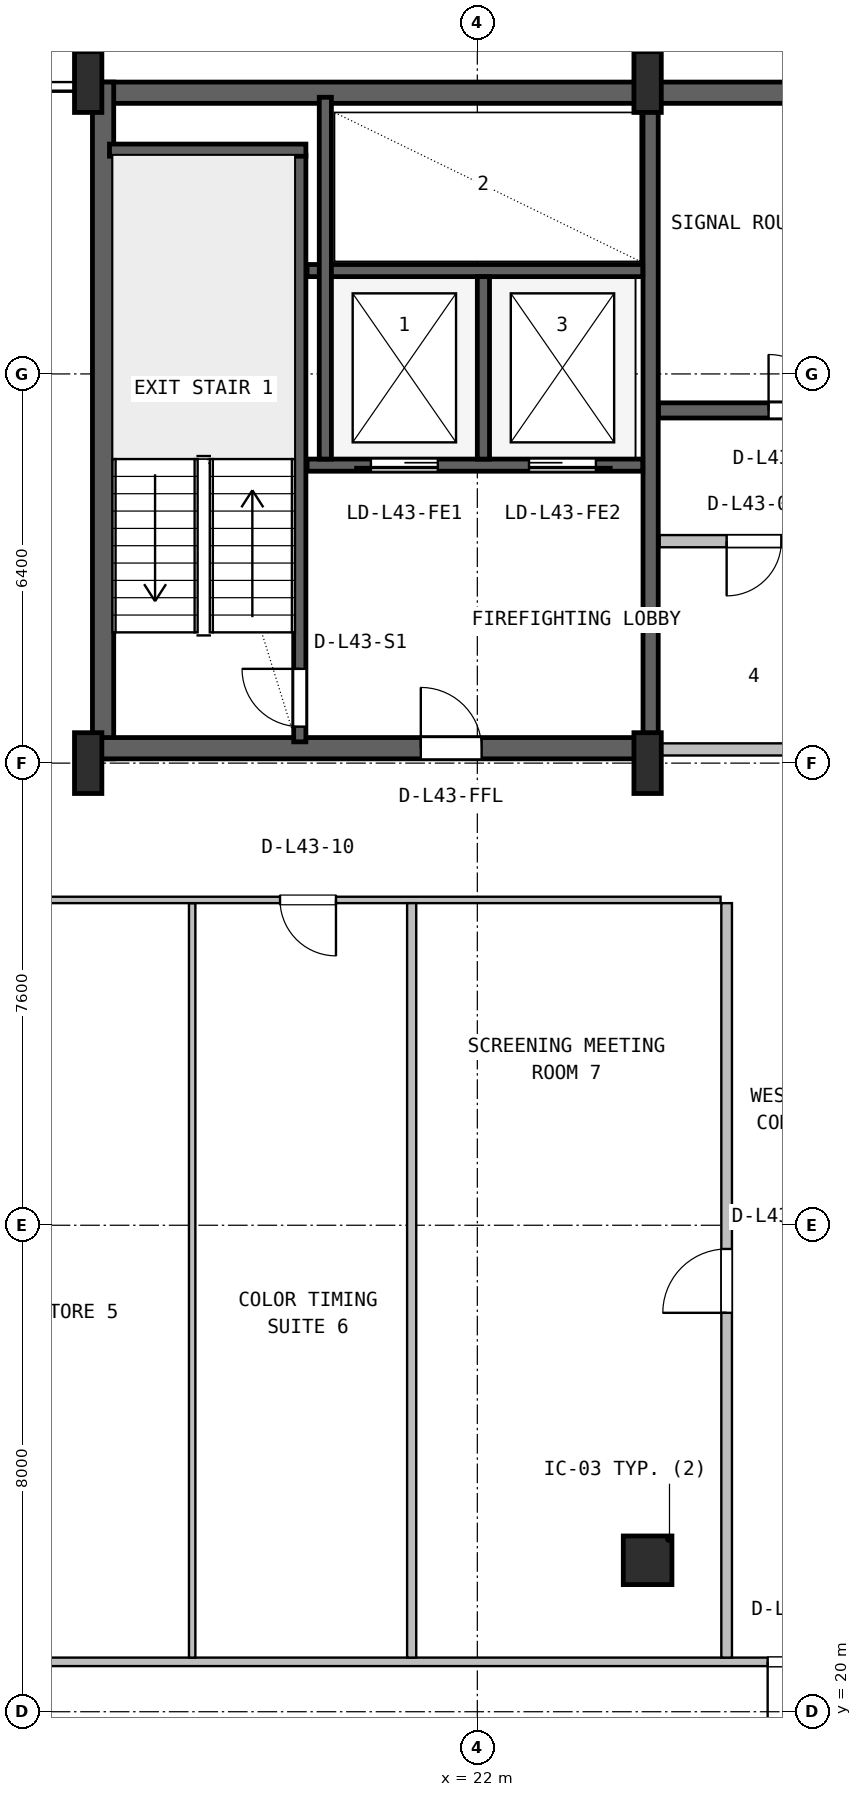
"""IFC4 building model, lengths in metres.
Left out: names, types, materials, properties, quantities, classifications, styles, units other than length and angle.
Written with IfcOpenShell. Run it as: python <this file> out.ifc"""

import sys

from ifc_helpers import new_model, si_unit, direction, frame, frame_2d, origin, origin_2d, place, context, subcontext, project, spatial, rectangle, i_section, extrude, source, transform, mapped, element, fill, save


model = new_model("IFC4")
c1 = context("Model", 3, precision=1e-05, world=origin(), true_north=direction((0.0, 1.0)))
c2 = subcontext(c1, "Body", "Model", "MODEL_VIEW")
j1 = project(units=[si_unit("LENGTHUNIT", "METRE"), si_unit("PLANEANGLEUNIT", "RADIAN")], contexts=[c1])
p1 = place(None, origin())
s1 = spatial("IfcSite", under=j1, at=p1, CompositionType="ELEMENT")
p2 = place(p1, origin())
s2 = spatial("IfcBuilding", under=s1, at=p2, CompositionType="ELEMENT")
p3 = place(p2, frame((0.0, 0.0, 176.2)))
s3 = spatial("IfcBuildingStorey", under=s2, at=p3, CompositionType="ELEMENT", Elevation=176.2)
p4 = place(p3, frame((15.6, 46.625, 0.0), z_axis=(0.0, 0.0, 1.0), x_axis=(1.0, 0.0, 0.0)))
e1 = element("IfcWall", 1, at=p4, inside=s3, PredefinedType="SHEAR", context=c2, shape_type="SweptSolid", body=[
    extrude(rectangle(XDim=36.8, YDim=0.35, at=frame_2d((18.4, 0.0))), origin(), (0.0, 0.0, 1.0), 3.55),
])
p5 = place(p3, frame((15.845, 35.67, 0.0), z_axis=(0.0, 0.0, 1.0), x_axis=(0.0, 1.0, 0.0)))
e2 = element("IfcWall", 2, at=p5, inside=s3, PredefinedType="SHEAR", context=c2, shape_type="SweptSolid", body=[
    extrude(rectangle(XDim=11.13, YDim=0.35, at=frame_2d((5.565, 0.0))), origin(), (0.0, 0.0, 1.0), 3.55),
])
p6 = place(p3, frame((15.67, 35.845, 0.0), z_axis=(0.0, 0.0, 1.0), x_axis=(1.0, 0.0, 0.0)))
e3 = element("IfcWall", 3, at=p6, inside=s3, PredefinedType="SHEAR", context=c2, shape_type="SweptSolid", body=[
    extrude(rectangle(XDim=9.13, YDim=0.35, at=frame_2d((4.565, 0.0))), origin(), (0.0, 0.0, 1.0), 3.55),
])
p7 = place(p6, frame((5.4, 0.0, 0.0)))
e4 = element("IfcOpeningElement", 4, at=p7, cuts=e3, PredefinedType="OPENING", context=c2, shape_type="SweptSolid", body=[
    extrude(rectangle(XDim=1.0, YDim=2.1, at=frame_2d((0.5, 1.05))), frame((0.0, 0.185, 0.0), z_axis=(0.0, -1.0, 0.0), x_axis=(1.0, 0.0, 0.0)), (0.0, 0.0, 1.0), 0.37),
])
m1 = source(origin(), c2, "Body", "SweptSolid", [
    extrude(i_section(OverallWidth=0.45, OverallDepth=1.0, WebThickness=0.016, FlangeThickness=0.03, FilletRadius=0.016, at=origin_2d()), origin(), (0.0, 0.0, 1.0), 3.8),
])
for number, where, z_axis, x_axis in (
    (5, (15.6, 35.6, 0.0), (0.0, 0.0, 1.0), (1.0, 0.0, 0.0)),
    (6, (15.6, 46.8, 0.0), (0.0, 0.0, 1.0), (1.0, 0.0, 0.0)),
    (7, (24.8, 35.6, 0.0), (0.0, 0.0, 1.0), (1.0, 0.0, 0.0)),
    (8, (24.8, 46.8, 0.0), (0.0, 0.0, 1.0), (1.0, 0.0, 0.0)),
):
    element("IfcColumn", number, at=place(p3, frame(where, z_axis=z_axis, x_axis=x_axis)), inside=s3, PredefinedType="COLUMN", context=c2, shape_type="MappedRepresentation", body=[
        mapped(m1, transform((0.0, 0.0, 0.0), x_axis=(1.0, 0.0, 0.0), y_axis=(0.0, 1.0, 0.0), z_axis=(0.0, 0.0, 1.0), scale=1.0)),
    ])
m2 = source(origin(), c2, "Body", "SweptSolid", [
    extrude(rectangle(XDim=0.8, YDim=0.8, at=origin_2d()), origin(), (0.0, 0.0, 1.0), 3.8),
])
p8 = place(p3, frame((24.8, 22.49, 0.0), z_axis=(0.0, 0.0, 1.0), x_axis=(1.0, 0.0, 0.0)))
e9 = element("IfcColumn", 9, at=p8, inside=s3, PredefinedType="COLUMN", context=c2, shape_type="MappedRepresentation", body=[
    mapped(m2, transform((0.0, 0.0, 0.0), x_axis=(1.0, 0.0, 0.0), y_axis=(0.0, 1.0, 0.0), z_axis=(0.0, 0.0, 1.0), scale=1.0)),
])
p9 = place(p3, frame((19.08, 35.95, 0.0), z_axis=(0.0, 0.0, 1.0), x_axis=(0.0, 1.0, 0.0)))
e10 = element("IfcWall", 10, at=p9, inside=s3, PredefinedType="SHEAR", context=c2, shape_type="SweptSolid", body=[
    extrude(rectangle(XDim=9.65, YDim=0.2, at=frame_2d((4.825, 0.0))), origin(), (0.0, 0.0, 1.0), 3.55),
])
p10 = place(p9, frame((0.25, 0.0, 0.0)))
e11 = element("IfcOpeningElement", 11, at=p10, cuts=e10, PredefinedType="OPENING", context=c2, shape_type="SweptSolid", body=[
    extrude(rectangle(XDim=0.95, YDim=2.1, at=frame_2d((0.475, 1.05))), frame((0.0, 0.11, 0.0), z_axis=(0.0, -1.0, 0.0), x_axis=(1.0, 0.0, 0.0)), (0.0, 0.0, 1.0), 0.22),
])
p11 = place(p3, frame((15.95, 45.68, 0.0), z_axis=(0.0, 0.0, 1.0), x_axis=(1.0, 0.0, 0.0)))
e12 = element("IfcWall", 12, at=p11, inside=s3, PredefinedType="SHEAR", context=c2, shape_type="SweptSolid", body=[
    extrude(rectangle(XDim=3.23, YDim=0.2, at=frame_2d((1.615, 0.0))), origin(), (0.0, 0.0, 1.0), 3.55),
])
p12 = place(p3, frame((24.85, 36.05, 0.0), z_axis=(0.0, 0.0, 1.0), x_axis=(0.0, 1.0, 0.0)))
e13 = element("IfcWall", 13, at=p12, inside=s3, PredefinedType="SHEAR", context=c2, shape_type="SweptSolid", body=[
    extrude(rectangle(XDim=10.45, YDim=0.25, at=frame_2d((5.225, 0.0))), origin(), (0.0, 0.0, 1.0), 3.55),
])
p13 = place(p3, frame((19.2, 40.5, 0.0), z_axis=(0.0, 0.0, 1.0), x_axis=(1.0, 0.0, 0.0)))
e14 = element("IfcWall", 14, at=p13, inside=s3, PredefinedType="SHEAR", context=c2, shape_type="SweptSolid", body=[
    extrude(rectangle(XDim=5.52, YDim=0.2, at=frame_2d((2.76, 0.0))), origin(), (0.0, 0.0, 1.0), 3.55),
])
p14 = place(p13, frame((1.05, 0.0, 0.0)))
e15 = element("IfcOpeningElement", 15, at=p14, cuts=e14, PredefinedType="OPENING", context=c2, shape_type="SweptSolid", body=[
    extrude(rectangle(XDim=1.1, YDim=2.18, at=frame_2d((0.55, 1.09))), frame((0.0, 0.11, 0.0), z_axis=(0.0, -1.0, 0.0), x_axis=(1.0, 0.0, 0.0)), (0.0, 0.0, 1.0), 0.22),
])
p15 = place(p13, frame((3.65, 0.0, 0.0)))
e16 = element("IfcOpeningElement", 16, at=p15, cuts=e14, PredefinedType="OPENING", context=c2, shape_type="SweptSolid", body=[
    extrude(rectangle(XDim=1.1, YDim=2.18, at=frame_2d((0.55, 1.09))), frame((0.0, 0.11, 0.0), z_axis=(0.0, -1.0, 0.0), x_axis=(1.0, 0.0, 0.0)), (0.0, 0.0, 1.0), 0.22),
])
p16 = place(p3, frame((19.2, 43.7, 0.0), z_axis=(0.0, 0.0, 1.0), x_axis=(1.0, 0.0, 0.0)))
e17 = element("IfcWall", 17, at=p16, inside=s3, PredefinedType="SHEAR", context=c2, shape_type="SweptSolid", body=[
    extrude(rectangle(XDim=5.52, YDim=0.2, at=frame_2d((2.76, 0.0))), origin(), (0.0, 0.0, 1.0), 3.55),
])
p17 = place(p3, frame((22.1, 40.6, 0.0), z_axis=(0.0, 0.0, 1.0), x_axis=(0.0, 1.0, 0.0)))
e18 = element("IfcWall", 18, at=p17, inside=s3, PredefinedType="SHEAR", context=c2, shape_type="SweptSolid", body=[
    extrude(rectangle(XDim=3.0, YDim=0.2, at=frame_2d((1.5, 0.0))), origin(), (0.0, 0.0, 1.0), 3.55),
])
p18 = place(p3, frame((19.5, 40.6, 0.0), z_axis=(0.0, 0.0, 1.0), x_axis=(0.0, 1.0, 0.0)))
e19 = element("IfcWall", 19, at=p18, inside=s3, PredefinedType="SHEAR", context=c2, shape_type="SweptSolid", body=[
    extrude(rectangle(XDim=5.95, YDim=0.2, at=frame_2d((2.975, 0.0))), origin(), (0.0, 0.0, 1.0), 3.55),
])
p19 = place(p3, frame((24.98, 41.4, 0.0), z_axis=(0.0, 0.0, 1.0), x_axis=(1.0, 0.0, 0.0)))
e20 = element("IfcWall", 20, at=p19, inside=s3, PredefinedType="SHEAR", context=c2, shape_type="SweptSolid", body=[
    extrude(rectangle(XDim=23.82, YDim=0.25, at=frame_2d((11.91, 0.0))), origin(), (0.0, 0.0, 1.0), 3.55),
])
p20 = place(p19, frame((8.87, 0.0, 0.0)))
e21 = element("IfcOpeningElement", 21, at=p20, cuts=e20, PredefinedType="OPENING", context=c2, shape_type="SweptSolid", body=[
    extrude(rectangle(XDim=1.1, YDim=2.18, at=frame_2d((0.55, 1.09))), frame((0.0, 0.135, 0.0), z_axis=(0.0, -1.0, 0.0), x_axis=(1.0, 0.0, 0.0)), (0.0, 0.0, 1.0), 0.27),
])
p21 = place(p19, frame((11.47, 0.0, 0.0)))
e22 = element("IfcOpeningElement", 22, at=p21, cuts=e20, PredefinedType="OPENING", context=c2, shape_type="SweptSolid", body=[
    extrude(rectangle(XDim=1.1, YDim=2.18, at=frame_2d((0.55, 1.09))), frame((0.0, 0.135, 0.0), z_axis=(0.0, -1.0, 0.0), x_axis=(1.0, 0.0, 0.0)), (0.0, 0.0, 1.0), 0.27),
])
p22 = place(p19, frame((14.07, 0.0, 0.0)))
e23 = element("IfcOpeningElement", 23, at=p22, cuts=e20, PredefinedType="OPENING", context=c2, shape_type="SweptSolid", body=[
    extrude(rectangle(XDim=1.1, YDim=2.18, at=frame_2d((0.55, 1.09))), frame((0.0, 0.135, 0.0), z_axis=(0.0, -1.0, 0.0), x_axis=(1.0, 0.0, 0.0)), (0.0, 0.0, 1.0), 0.27),
])
p23 = place(p19, frame((1.81, 0.0, 0.0)))
e24 = element("IfcOpeningElement", 24, at=p23, cuts=e20, PredefinedType="OPENING", context=c2, shape_type="SweptSolid", body=[
    extrude(rectangle(XDim=0.92, YDim=2.08, at=frame_2d((0.46, 1.04))), frame((0.0, 0.135, 0.0), z_axis=(0.0, -1.0, 0.0), x_axis=(1.0, 0.0, 0.0)), (0.0, 0.0, 1.0), 0.27),
])
p24 = place(p19, frame((5.71, 0.0, 0.0)))
e25 = element("IfcOpeningElement", 25, at=p24, cuts=e20, PredefinedType="OPENING", context=c2, shape_type="SweptSolid", body=[
    extrude(rectangle(XDim=0.92, YDim=2.08, at=frame_2d((0.46, 1.04))), frame((0.0, 0.135, 0.0), z_axis=(0.0, -1.0, 0.0), x_axis=(1.0, 0.0, 0.0)), (0.0, 0.0, 1.0), 0.27),
])
p25 = place(p3, frame((25.0, 35.825, 0.0), z_axis=(0.0, 0.0, 1.0), x_axis=(1.0, 0.0, 0.0)))
e26 = element("IfcWall", 26, at=p25, inside=s3, PredefinedType="SOLIDWALL", context=c2, shape_type="SweptSolid", body=[
    extrude(rectangle(XDim=12.95, YDim=0.2, at=frame_2d((6.475, 0.0))), origin(), (0.0, 0.0, 1.0), 2.575),
])
p26 = place(p3, frame((25.0, 39.25, 0.0), z_axis=(0.0, 0.0, 1.0), x_axis=(1.0, 0.0, 0.0)))
e27 = element("IfcWall", 27, at=p26, inside=s3, PredefinedType="SOLIDWALL", context=c2, shape_type="SweptSolid", body=[
    extrude(rectangle(XDim=12.95, YDim=0.2, at=frame_2d((6.475, 0.0))), origin(), (0.0, 0.0, 1.0), 3.53),
])
p27 = place(p26, frame((1.1, 0.0, 0.0)))
e28 = element("IfcOpeningElement", 28, at=p27, cuts=e27, PredefinedType="OPENING", context=c2, shape_type="SweptSolid", body=[
    extrude(rectangle(XDim=0.9, YDim=2.06, at=frame_2d((0.45, 1.03))), frame((0.0, 0.11, 0.0), z_axis=(0.0, -1.0, 0.0), x_axis=(1.0, 0.0, 0.0)), (0.0, 0.0, 1.0), 0.22),
])
p28 = place(p26, frame((4.5, 0.0, 0.0)))
e29 = element("IfcOpeningElement", 29, at=p28, cuts=e27, PredefinedType="OPENING", context=c2, shape_type="SweptSolid", body=[
    extrude(rectangle(XDim=0.9, YDim=2.06, at=frame_2d((0.45, 1.03))), frame((0.0, 0.11, 0.0), z_axis=(0.0, -1.0, 0.0), x_axis=(1.0, 0.0, 0.0)), (0.0, 0.0, 1.0), 0.22),
])
p29 = place(p26, frame((7.84, 0.0, 0.0)))
e30 = element("IfcOpeningElement", 30, at=p29, cuts=e27, PredefinedType="OPENING", context=c2, shape_type="SweptSolid", body=[
    extrude(rectangle(XDim=0.92, YDim=2.08, at=frame_2d((0.46, 1.04))), frame((0.0, 0.11, 0.0), z_axis=(0.0, -1.0, 0.0), x_axis=(1.0, 0.0, 0.0)), (0.0, 0.0, 1.0), 0.22),
])
p30 = place(p26, frame((10.875, 0.0, 0.0)))
e31 = element("IfcOpeningElement", 31, at=p30, cuts=e27, PredefinedType="OPENING", context=c2, shape_type="SweptSolid", body=[
    extrude(rectangle(XDim=1.2, YDim=2.1, at=frame_2d((0.6, 1.05))), frame((0.0, 0.11, 0.0), z_axis=(0.0, -1.0, 0.0), x_axis=(1.0, 0.0, 0.0)), (0.0, 0.0, 1.0), 0.22),
])
p31 = place(p3, frame((7.18, 20.82, 0.0), z_axis=(0.0, 0.0, 1.0), x_axis=(1.0, 0.0, 0.0)))
e32 = element("IfcWall", 32, at=p31, inside=s3, PredefinedType="PARTITIONING", context=c2, shape_type="SweptSolid", body=[
    extrude(rectangle(XDim=53.64, YDim=0.14, at=frame_2d((26.82, 0.0))), origin(), (0.0, 0.0, 1.0), 2.909),
])
p32 = place(p31, frame((19.595, 0.0, 0.0)))
e33 = element("IfcOpeningElement", 33, at=p32, cuts=e32, PredefinedType="OPENING", context=c2, shape_type="SweptSolid", body=[
    extrude(rectangle(XDim=1.0, YDim=2.1, at=frame_2d((0.5, 1.05))), frame((0.0, 0.08, 0.0), z_axis=(0.0, -1.0, 0.0), x_axis=(1.0, 0.0, 0.0)), (0.0, 0.0, 1.0), 0.16),
])
p33 = place(p31, frame((24.15, 0.0, 0.0)))
e34 = element("IfcOpeningElement", 34, at=p33, cuts=e32, PredefinedType="OPENING", context=c2, shape_type="SweptSolid", body=[
    extrude(rectangle(XDim=0.88, YDim=2.06, at=frame_2d((0.44, 1.03))), frame((0.0, 0.08, 0.0), z_axis=(0.0, -1.0, 0.0), x_axis=(1.0, 0.0, 0.0)), (0.0, 0.0, 1.0), 0.16),
])
p34 = place(p31, frame((32.42, 0.0, 0.0)))
e35 = element("IfcOpeningElement", 35, at=p34, cuts=e32, PredefinedType="OPENING", context=c2, shape_type="SweptSolid", body=[
    extrude(rectangle(XDim=0.88, YDim=2.06, at=frame_2d((0.44, 1.03))), frame((0.0, 0.08, 0.0), z_axis=(0.0, -1.0, 0.0), x_axis=(1.0, 0.0, 0.0)), (0.0, 0.0, 1.0), 0.16),
])
p35 = place(p31, frame((38.545, 0.0, 0.0)))
e36 = element("IfcOpeningElement", 36, at=p35, cuts=e32, PredefinedType="OPENING", context=c2, shape_type="SweptSolid", body=[
    extrude(rectangle(XDim=0.88, YDim=2.06, at=frame_2d((0.44, 1.03))), frame((0.0, 0.08, 0.0), z_axis=(0.0, -1.0, 0.0), x_axis=(1.0, 0.0, 0.0)), (0.0, 0.0, 1.0), 0.16),
])
p36 = place(p3, frame((17.31, 20.89, 0.0), z_axis=(0.0, 0.0, 1.0), x_axis=(0.0, 1.0, 0.0)))
e37 = element("IfcWall", 37, at=p36, inside=s3, PredefinedType="PARTITIONING", context=c2, shape_type="SweptSolid", body=[
    extrude(rectangle(XDim=12.407, YDim=0.105, at=frame_2d((6.204, 0.0))), origin(), (0.0, 0.0, 1.0), 3.222),
])
p37 = place(p3, frame((7.18, 33.35, 0.0), z_axis=(0.0, 0.0, 1.0), x_axis=(1.0, 0.0, 0.0)))
e38 = element("IfcWall", 38, at=p37, inside=s3, PredefinedType="PARTITIONING", context=c2, shape_type="SweptSolid", body=[
    extrude(rectangle(XDim=18.82, YDim=0.105, at=frame_2d((9.41, 0.0))), origin(), (0.0, 0.0, 1.0), 2.909),
])
p38 = place(p37, frame((6.56, 0.0, 0.0)))
e39 = element("IfcOpeningElement", 39, at=p38, cuts=e38, PredefinedType="OPENING", context=c2, shape_type="SweptSolid", body=[
    extrude(rectangle(XDim=0.88, YDim=2.06, at=frame_2d((0.44, 1.03))), frame((0.0, 0.062, 0.0), z_axis=(0.0, -1.0, 0.0), x_axis=(1.0, 0.0, 0.0)), (0.0, 0.0, 1.0), 0.125),
])
p39 = place(p37, frame((11.575, 0.0, 0.0)))
e40 = element("IfcOpeningElement", 40, at=p39, cuts=e38, PredefinedType="OPENING", context=c2, shape_type="SweptSolid", body=[
    extrude(rectangle(XDim=0.92, YDim=2.08, at=frame_2d((0.46, 1.04))), frame((0.0, 0.062, 0.0), z_axis=(0.0, -1.0, 0.0), x_axis=(1.0, 0.0, 0.0)), (0.0, 0.0, 1.0), 0.125),
])
p40 = place(p3, frame((20.92, 20.89, 0.0), z_axis=(0.0, 0.0, 1.0), x_axis=(0.0, 1.0, 0.0)))
e41 = element("IfcWall", 41, at=p40, inside=s3, PredefinedType="PARTITIONING", context=c2, shape_type="SweptSolid", body=[
    extrude(rectangle(XDim=12.407, YDim=0.15, at=frame_2d((6.204, 0.0))), origin(), (0.0, 0.0, 1.0), 3.222),
])
p41 = place(p3, frame((26.1, 20.89, 0.0), z_axis=(0.0, 0.0, 1.0), x_axis=(0.0, 1.0, 0.0)))
e42 = element("IfcWall", 42, at=p41, inside=s3, PredefinedType="PARTITIONING", context=c2, shape_type="SweptSolid", body=[
    extrude(rectangle(XDim=12.407, YDim=0.175, at=frame_2d((6.204, 0.0))), origin(), (0.0, 0.0, 1.0), 2.909),
])
p42 = place(p41, frame((5.67, 0.0, 0.0)))
e43 = element("IfcOpeningElement", 43, at=p42, cuts=e42, PredefinedType="OPENING", context=c2, shape_type="SweptSolid", body=[
    extrude(rectangle(XDim=1.05, YDim=2.1, at=frame_2d((0.525, 1.05))), frame((0.0, 0.098, 0.0), z_axis=(0.0, -1.0, 0.0), x_axis=(1.0, 0.0, 0.0)), (0.0, 0.0, 1.0), 0.195),
])
m3 = source(origin(), c2, "Body", "SweptSolid", [
    extrude(rectangle(XDim=0.95, YDim=2.1, at=frame_2d((0.475, 1.05))), frame((0.0, 0.025, 0.0), z_axis=(0.0, -1.0, 0.0), x_axis=(1.0, 0.0, 0.0)), (0.0, 0.0, 1.0), 0.05),
])
p43 = place(p10, origin())
e44 = element("IfcDoor", 44, at=p43, inside=s3, OperationType="SINGLE_SWING_RIGHT", PredefinedType="DOOR", context=c2, shape_type="MappedRepresentation", body=[
    mapped(m3, transform((0.0, 0.0, 0.0), x_axis=(1.0, 0.0, 0.0), y_axis=(0.0, 1.0, 0.0), z_axis=(0.0, 0.0, 1.0), scale=1.0)),
])
fill(e11, e44)
m4 = source(origin(), c2, "Body", "SweptSolid", [
    extrude(rectangle(XDim=1.0, YDim=2.1, at=frame_2d((0.5, 1.05))), frame((0.0, 0.025, 0.0), z_axis=(0.0, -1.0, 0.0), x_axis=(1.0, 0.0, 0.0)), (0.0, 0.0, 1.0), 0.05),
])
p44 = place(p7, origin())
e45 = element("IfcDoor", 45, at=p44, inside=s3, OperationType="SINGLE_SWING_LEFT", PredefinedType="DOOR", context=c2, shape_type="MappedRepresentation", body=[
    mapped(m4, transform((0.0, 0.0, 0.0), x_axis=(1.0, 0.0, 0.0), y_axis=(0.0, 1.0, 0.0), z_axis=(0.0, 0.0, 1.0), scale=1.0)),
])
fill(e4, e45)
m5 = source(origin(), c2, "Body", "SweptSolid", [
    extrude(rectangle(XDim=1.1, YDim=2.18, at=frame_2d((0.55, 1.09))), frame((0.0, 0.025, 0.0), z_axis=(0.0, -1.0, 0.0), x_axis=(1.0, 0.0, 0.0)), (0.0, 0.0, 1.0), 0.05),
])
p45 = place(p14, frame((1.1, 0.0, 0.0), z_axis=(0.0, 0.0, 1.0), x_axis=(-1.0, 0.0, 0.0)))
e46 = element("IfcDoor", 46, at=p45, inside=s3, OperationType="SLIDING_TO_LEFT", PredefinedType="DOOR", context=c2, shape_type="MappedRepresentation", body=[
    mapped(m5, transform((0.0, 0.0, 0.0), x_axis=(1.0, 0.0, 0.0), y_axis=(0.0, 1.0, 0.0), z_axis=(0.0, 0.0, 1.0), scale=1.0)),
])
fill(e15, e46)
p46 = place(p15, frame((1.1, 0.0, 0.0), z_axis=(0.0, 0.0, 1.0), x_axis=(-1.0, 0.0, 0.0)))
e47 = element("IfcDoor", 47, at=p46, inside=s3, OperationType="SLIDING_TO_RIGHT", PredefinedType="DOOR", context=c2, shape_type="MappedRepresentation", body=[
    mapped(m5, transform((0.0, 0.0, 0.0), x_axis=(1.0, 0.0, 0.0), y_axis=(0.0, 1.0, 0.0), z_axis=(0.0, 0.0, 1.0), scale=1.0)),
])
fill(e16, e47)
m6 = source(origin(), c2, "Body", "SweptSolid", [
    extrude(rectangle(XDim=0.92, YDim=2.08, at=frame_2d((0.46, 1.04))), frame((0.0, 0.025, 0.0), z_axis=(0.0, -1.0, 0.0), x_axis=(1.0, 0.0, 0.0)), (0.0, 0.0, 1.0), 0.05),
])
p47 = place(p23, origin())
e48 = element("IfcDoor", 48, at=p47, inside=s3, OperationType="SINGLE_SWING_LEFT", PredefinedType="DOOR", context=c2, shape_type="MappedRepresentation", body=[
    mapped(m6, transform((0.0, 0.0, 0.0), x_axis=(1.0, 0.0, 0.0), y_axis=(0.0, 1.0, 0.0), z_axis=(0.0, 0.0, 1.0), scale=1.0)),
])
fill(e24, e48)
m7 = source(origin(), c2, "Body", "SweptSolid", [
    extrude(rectangle(XDim=0.9, YDim=2.06, at=frame_2d((0.45, 1.03))), frame((0.0, 0.025, 0.0), z_axis=(0.0, -1.0, 0.0), x_axis=(1.0, 0.0, 0.0)), (0.0, 0.0, 1.0), 0.05),
])
p48 = place(p27, frame((0.9, 0.0, 0.0), z_axis=(0.0, 0.0, 1.0), x_axis=(-1.0, 0.0, 0.0)))
e49 = element("IfcDoor", 49, at=p48, inside=s3, OperationType="SINGLE_SWING_LEFT", PredefinedType="DOOR", context=c2, shape_type="MappedRepresentation", body=[
    mapped(m7, transform((0.0, 0.0, 0.0), x_axis=(1.0, 0.0, 0.0), y_axis=(0.0, 1.0, 0.0), z_axis=(0.0, 0.0, 1.0), scale=1.0)),
])
fill(e28, e49)
m8 = source(origin(), c2, "Body", "SweptSolid", [
    extrude(rectangle(XDim=1.0, YDim=2.1, at=frame_2d((0.5, 1.05))), frame((0.0, 0.025, 0.0), z_axis=(0.0, -1.0, 0.0), x_axis=(1.0, 0.0, 0.0)), (0.0, 0.0, 1.0), 0.05),
])
p49 = place(p32, frame((1.0, 0.0, 0.0), z_axis=(0.0, 0.0, 1.0), x_axis=(-1.0, 0.0, 0.0)))
e50 = element("IfcDoor", 50, at=p49, inside=s3, OperationType="SINGLE_SWING_LEFT", PredefinedType="DOOR", context=c2, shape_type="MappedRepresentation", body=[
    mapped(m8, transform((0.0, 0.0, 0.0), x_axis=(1.0, 0.0, 0.0), y_axis=(0.0, 1.0, 0.0), z_axis=(0.0, 0.0, 1.0), scale=1.0)),
])
fill(e33, e50)
p50 = place(p39, frame((0.92, 0.0, 0.0), z_axis=(0.0, 0.0, 1.0), x_axis=(-1.0, 0.0, 0.0)))
e51 = element("IfcDoor", 51, at=p50, inside=s3, OperationType="SINGLE_SWING_RIGHT", PredefinedType="DOOR", context=c2, shape_type="MappedRepresentation", body=[
    mapped(m6, transform((0.0, 0.0, 0.0), x_axis=(1.0, 0.0, 0.0), y_axis=(0.0, 1.0, 0.0), z_axis=(0.0, 0.0, 1.0), scale=1.0)),
])
fill(e40, e51)
m9 = source(origin(), c2, "Body", "SweptSolid", [
    extrude(rectangle(XDim=1.05, YDim=2.1, at=frame_2d((0.525, 1.05))), frame((0.0, 0.025, 0.0), z_axis=(0.0, -1.0, 0.0), x_axis=(1.0, 0.0, 0.0)), (0.0, 0.0, 1.0), 0.05),
])
p51 = place(p42, origin())
e52 = element("IfcDoor", 52, at=p51, inside=s3, OperationType="SINGLE_SWING_LEFT", PredefinedType="DOOR", context=c2, shape_type="MappedRepresentation", body=[
    mapped(m9, transform((0.0, 0.0, 0.0), x_axis=(1.0, 0.0, 0.0), y_axis=(0.0, 1.0, 0.0), z_axis=(0.0, 0.0, 1.0), scale=1.0)),
])
fill(e43, e52)
save(model, sys.argv[1])
